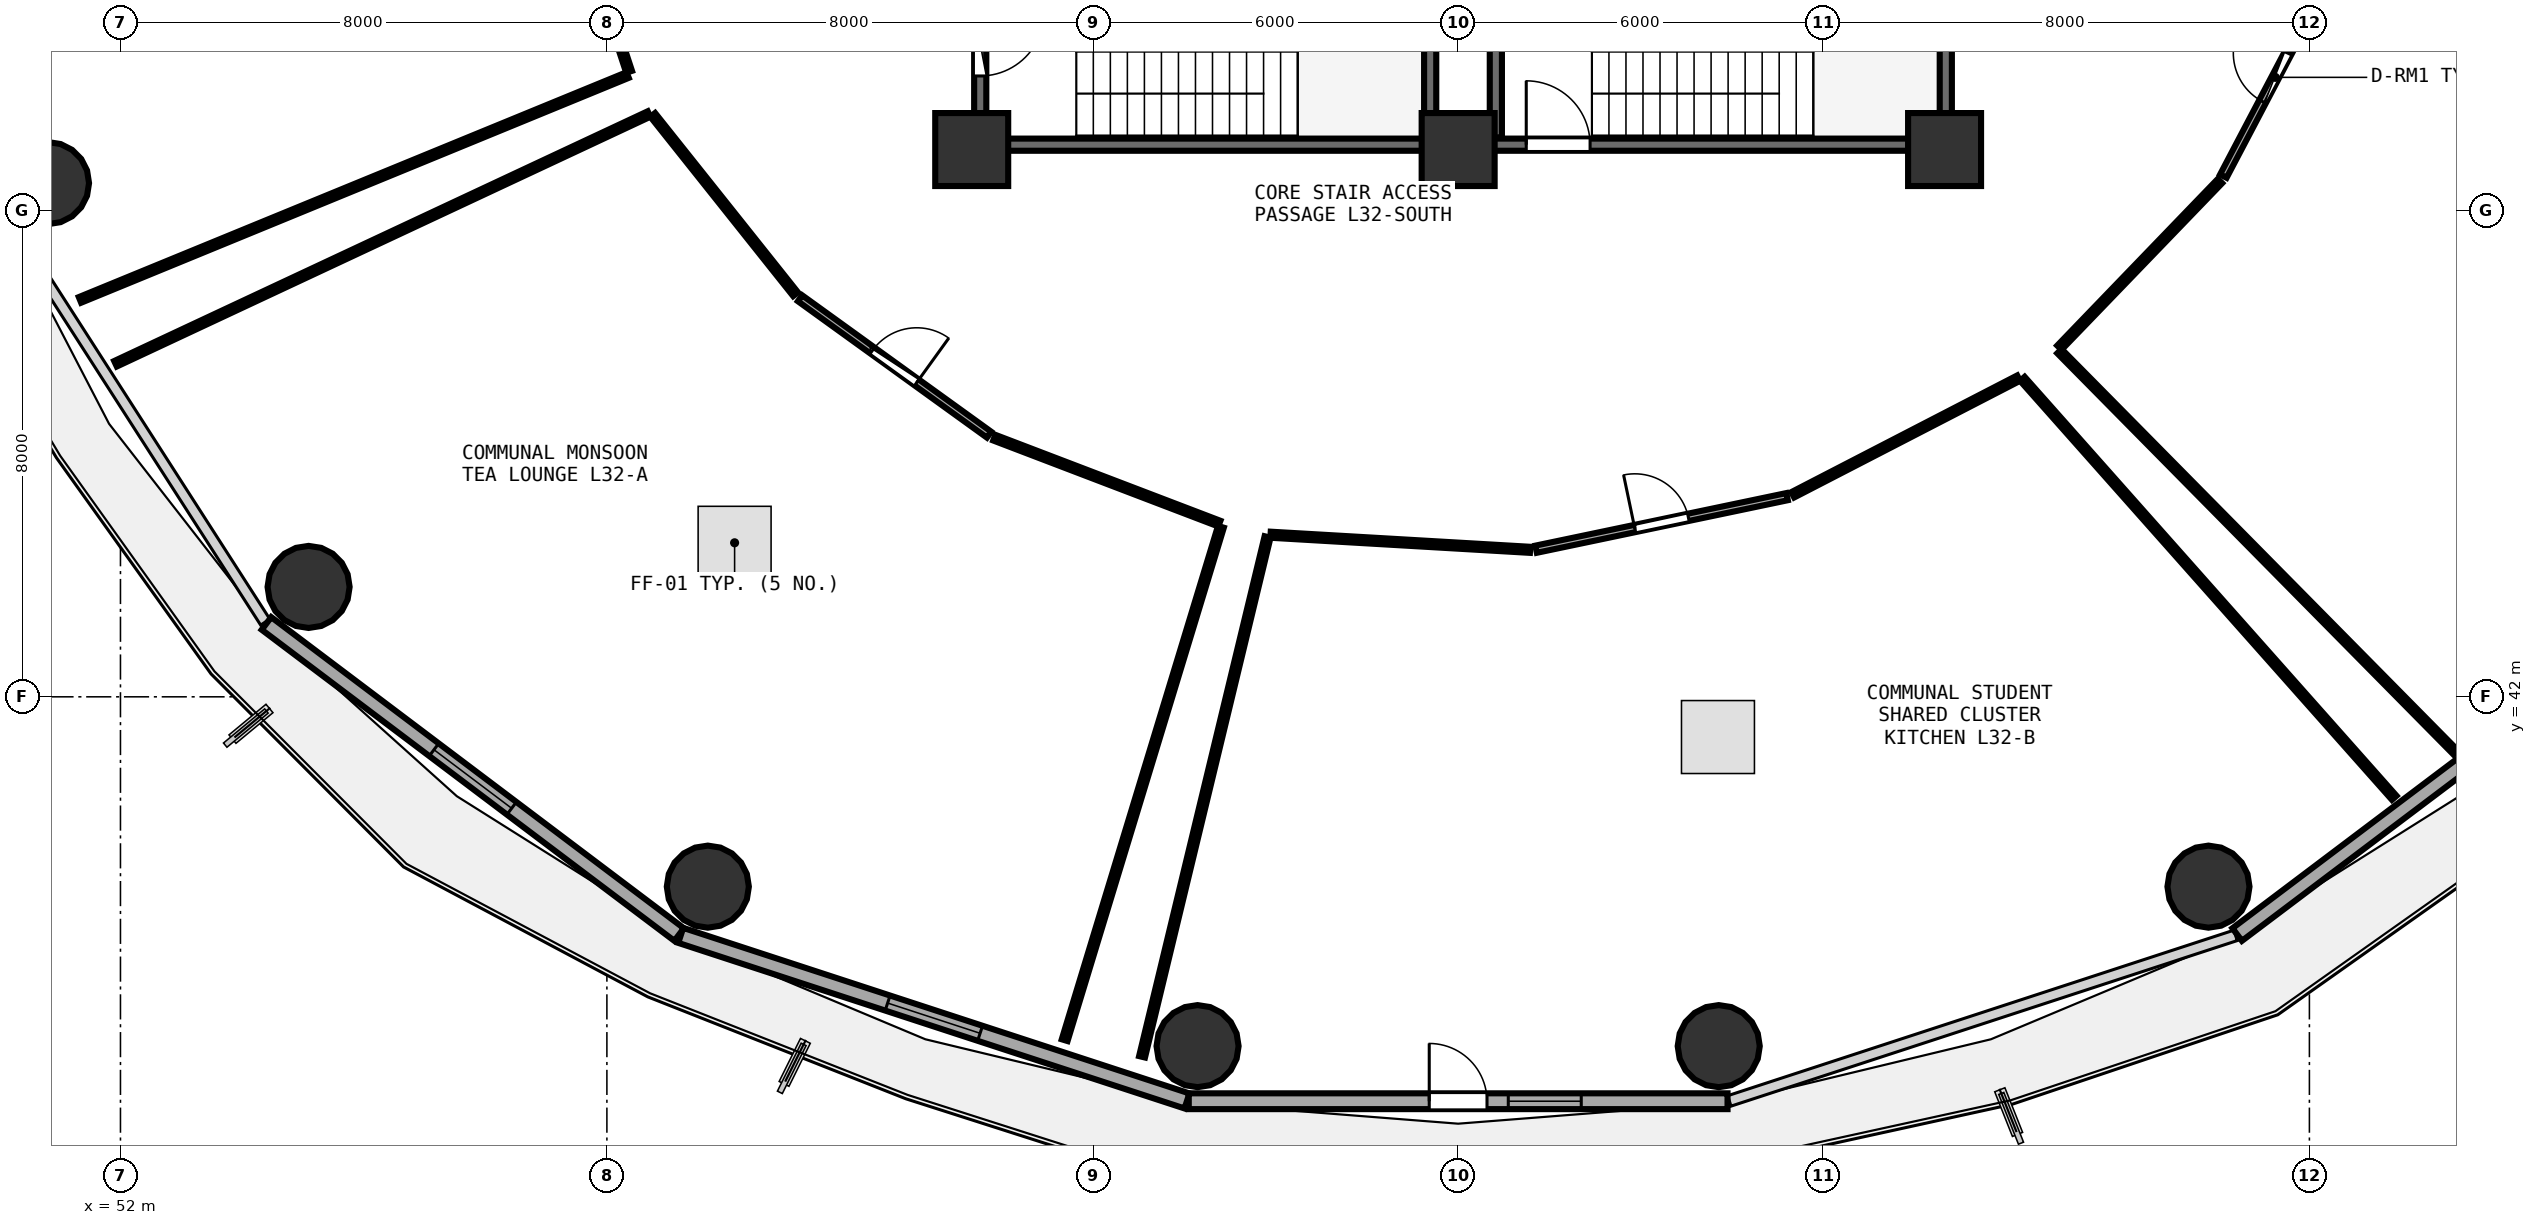
"""IFC4 building model, lengths in metres.
Left out: names, types, materials, properties, quantities, classifications, styles, units other than length and angle.
Written with IfcOpenShell. Run it as: python <this file> out.ifc"""

import sys

from ifc_helpers import new_model, si_unit, direction, frame, frame_2d, origin, origin_2d, place, context, subcontext, project, spatial, rectangle, circle, extrude, element, fill, save


model = new_model("IFC4")
c1 = context("Model", 3, precision=1e-05, world=origin(), true_north=direction((0.0, 1.0)))
c2 = subcontext(c1, "Body", "Model", "MODEL_VIEW")
j1 = project(units=[si_unit("LENGTHUNIT", "METRE"), si_unit("PLANEANGLEUNIT", "RADIAN")], contexts=[c1])
p1 = place(None, origin())
s1 = spatial("IfcSite", under=j1, at=p1, CompositionType="ELEMENT")
p2 = place(p1, origin())
s2 = spatial("IfcBuilding", under=s1, at=p2, CompositionType="ELEMENT")
p3 = place(p2, frame((0.0, 0.0, 125.1)))
s3 = spatial("IfcBuildingStorey", under=s2, at=p3, CompositionType="ELEMENT", Elevation=125.1)
for number, where, z_axis, x_axis in (
    (1, (66.0, 51.0, 0.0), (0.0, 0.0, 1.0), (1.0, 0.0, 0.0)),
    (2, (74.0, 51.0, 0.0), (0.0, 0.0, 1.0), (1.0, 0.0, 0.0)),
    (3, (82.0, 51.0, 0.0), (0.0, 0.0, 1.0), (1.0, 0.0, 0.0)),
):
    element("IfcColumn", number, at=place(p3, frame(where, z_axis=z_axis, x_axis=x_axis)), inside=s3, PredefinedType="PILASTER", context=c2, shape_type="SweptSolid", body=[
        extrude(rectangle(XDim=1.2, YDim=1.2, at=origin_2d()), origin(), (0.0, 0.0, 1.0), 4.76),
    ])
for number, where, z_axis, x_axis in (
    (4, (50.808, 50.448, 0.0), (0.0, 0.0, 1.0), (1.0, 0.0, 0.0)),
    (5, (55.094, 43.807, 0.0), (0.0, 0.0, 1.0), (1.0, 0.0, 0.0)),
    (6, (61.66, 38.878, 0.0), (0.0, 0.0, 1.0), (1.0, 0.0, 0.0)),
    (7, (69.714, 36.255, 0.0), (0.0, 0.0, 1.0), (1.0, 0.0, 0.0)),
    (8, (78.286, 36.255, 0.0), (0.0, 0.0, 1.0), (1.0, 0.0, 0.0)),
    (9, (86.34, 38.878, 0.0), (0.0, 0.0, 1.0), (1.0, 0.0, 0.0)),
):
    element("IfcColumn", number, at=place(p3, frame(where, z_axis=z_axis, x_axis=x_axis)), inside=s3, PredefinedType="COLUMN", context=c2, shape_type="SweptSolid", body=[
        extrude(circle(Radius=0.675, at=origin_2d()), origin(), (0.0, 0.0, 1.0), 4.76),
    ])
p4 = place(p3, frame((54.401, 43.207, 0.0), z_axis=(0.0, 0.0, 1.0), x_axis=(0.798501507879, -0.601992808857, 0.0)))
e10 = element("IfcWall", 10, at=p4, inside=s3, PredefinedType="SOLIDWALL", context=c2, shape_type="SweptSolid", body=[
    extrude(rectangle(XDim=8.499, YDim=0.26, at=frame_2d((4.25, 0.0))), origin(), (0.0, 0.0, 1.0), 4.345),
])
p5 = place(p4, frame((3.45, 0.0, 0.85)))
e11 = element("IfcOpeningElement", 11, at=p5, cuts=e10, PredefinedType="OPENING", context=c2, shape_type="SweptSolid", body=[
    extrude(rectangle(XDim=1.6, YDim=1.45, at=frame_2d((0.8, 0.725))), frame((0.0, 0.14, 0.0), z_axis=(0.0, -1.0, 0.0), x_axis=(1.0, 0.0, 0.0)), (0.0, 0.0, 1.0), 0.28),
])
p6 = place(p3, frame((61.214, 38.077, 0.0), z_axis=(0.0, 0.0, 1.0), x_axis=(0.950471101963, -0.310812941064, 0.0)))
e12 = element("IfcWall", 12, at=p6, inside=s3, PredefinedType="SOLIDWALL", context=c2, shape_type="SweptSolid", body=[
    extrude(rectangle(XDim=8.76, YDim=0.26, at=frame_2d((4.38, 0.0))), origin(), (0.0, 0.0, 1.0), 4.345),
])
p7 = place(p6, frame((3.58, 0.0, 0.85)))
e13 = element("IfcOpeningElement", 13, at=p7, cuts=e12, PredefinedType="OPENING", context=c2, shape_type="SweptSolid", body=[
    extrude(rectangle(XDim=1.6, YDim=1.45, at=frame_2d((0.8, 0.725))), frame((0.0, 0.14, 0.0), z_axis=(0.0, -1.0, 0.0), x_axis=(1.0, 0.0, 0.0)), (0.0, 0.0, 1.0), 0.28),
])
p8 = place(p3, frame((69.57, 35.349, 0.0), z_axis=(0.0, 0.0, 1.0), x_axis=(1.0, 0.0, 0.0)))
e14 = element("IfcWall", 14, at=p8, inside=s3, PredefinedType="SOLIDWALL", context=c2, shape_type="SweptSolid", body=[
    extrude(rectangle(XDim=8.861, YDim=0.26, at=frame_2d((4.43, 0.0))), origin(), (0.0, 0.0, 1.0), 4.345),
])
p9 = place(p8, frame((3.955, 0.0, 0.0)))
e15 = element("IfcOpeningElement", 15, at=p9, cuts=e14, PredefinedType="OPENING", context=c2, shape_type="SweptSolid", body=[
    extrude(rectangle(XDim=0.95, YDim=2.1, at=frame_2d((0.475, 1.05))), frame((0.0, 0.14, 0.0), z_axis=(0.0, -1.0, 0.0), x_axis=(1.0, 0.0, 0.0)), (0.0, 0.0, 1.0), 0.28),
])
p10 = place(p8, frame((5.255, 0.0, 0.85)))
e16 = element("IfcOpeningElement", 16, at=p10, cuts=e14, PredefinedType="OPENING", context=c2, shape_type="SweptSolid", body=[
    extrude(rectangle(XDim=1.2, YDim=1.45, at=frame_2d((0.6, 0.725))), frame((0.0, 0.14, 0.0), z_axis=(0.0, -1.0, 0.0), x_axis=(1.0, 0.0, 0.0)), (0.0, 0.0, 1.0), 0.28),
])
p11 = place(p3, frame((86.812, 38.09, 0.0), z_axis=(0.0, 0.0, 1.0), x_axis=(0.798501507879, 0.601992808857, 0.0)))
e17 = element("IfcWall", 17, at=p11, inside=s3, PredefinedType="SOLIDWALL", context=c2, shape_type="SweptSolid", body=[
    extrude(rectangle(XDim=8.499, YDim=0.26, at=frame_2d((4.25, 0.0))), origin(), (0.0, 0.0, 1.0), 4.345),
])
p12 = place(p11, frame((5.07, 0.0, 0.85)))
e18 = element("IfcOpeningElement", 18, at=p12, cuts=e17, PredefinedType="OPENING", context=c2, shape_type="SweptSolid", body=[
    extrude(rectangle(XDim=1.6, YDim=1.45, at=frame_2d((0.8, 0.725))), frame((0.0, 0.14, 0.0), z_axis=(0.0, -1.0, 0.0), x_axis=(1.0, 0.0, 0.0)), (0.0, 0.0, 1.0), 0.28),
])
p13 = place(p3, frame((74.0, 51.08, 0.0), z_axis=(0.0, 0.0, 1.0), x_axis=(1.0, 0.0, 0.0)))
e19 = element("IfcWall", 19, at=p13, inside=s3, PredefinedType="SHEAR", context=c2, shape_type="SweptSolid", body=[
    extrude(rectangle(XDim=7.9, YDim=0.2, at=frame_2d((3.95, 0.0))), origin(), (0.0, 0.0, 1.0), 4.36),
])
p14 = place(p13, frame((1.12, 0.0, 0.0)))
e20 = element("IfcOpeningElement", 20, at=p14, cuts=e19, PredefinedType="OPENING", context=c2, shape_type="SweptSolid", body=[
    extrude(rectangle(XDim=1.05, YDim=2.1, at=frame_2d((0.525, 1.05))), frame((0.0, 0.11, 0.0), z_axis=(0.0, -1.0, 0.0), x_axis=(1.0, 0.0, 0.0)), (0.0, 0.0, 1.0), 0.22),
])
for number, where, z_axis, x_axis in (
    (21, (82.02, 51.2, 0.0), (0.0, 0.0, 1.0), (0.0, 1.0, 0.0)),
    (22, (74.62, 54.27, 0.0), (0.0, 0.0, 1.0), (0.0, -1.0, 0.0)),
):
    element("IfcWall", number, at=place(p3, frame(where, z_axis=z_axis, x_axis=x_axis)), inside=s3, PredefinedType="SHEAR", context=c2, shape_type="SweptSolid", body=[
        extrude(rectangle(XDim=3.07, YDim=0.2, at=frame_2d((1.535, 0.0))), origin(), (0.0, 0.0, 1.0), 4.36),
    ])
p15 = place(p3, frame((66.26, 51.08, 0.0), z_axis=(0.0, 0.0, 1.0), x_axis=(1.0, 0.0, 0.0)))
e23 = element("IfcWall", 23, at=p15, inside=s3, PredefinedType="SHEAR", context=c2, shape_type="SweptSolid", body=[
    extrude(rectangle(XDim=7.16, YDim=0.2, at=frame_2d((3.58, 0.0))), origin(), (0.0, 0.0, 1.0), 4.36),
])
p16 = place(p3, frame((73.54, 51.2, 0.0), z_axis=(0.0, 0.0, 1.0), x_axis=(0.0, 1.0, 0.0)))
e24 = element("IfcWall", 24, at=p16, inside=s3, PredefinedType="SHEAR", context=c2, shape_type="SweptSolid", body=[
    extrude(rectangle(XDim=3.07, YDim=0.2, at=frame_2d((1.535, 0.0))), origin(), (0.0, 0.0, 1.0), 4.36),
])
p17 = place(p3, frame((66.14, 54.27, 0.0), z_axis=(0.0, 0.0, 1.0), x_axis=(0.0, -1.0, 0.0)))
e25 = element("IfcWall", 25, at=p17, inside=s3, PredefinedType="SHEAR", context=c2, shape_type="SweptSolid", body=[
    extrude(rectangle(XDim=3.07, YDim=0.2, at=frame_2d((1.535, 0.0))), origin(), (0.0, 0.0, 1.0), 4.36),
])
p18 = place(p17, frame((1.01, 0.0, 0.0)))
e26 = element("IfcOpeningElement", 26, at=p18, cuts=e25, PredefinedType="OPENING", context=c2, shape_type="SweptSolid", body=[
    extrude(rectangle(XDim=1.05, YDim=2.1, at=frame_2d((0.525, 1.05))), frame((0.0, 0.11, 0.0), z_axis=(0.0, -1.0, 0.0), x_axis=(1.0, 0.0, 0.0)), (0.0, 0.0, 1.0), 0.22),
])
p19 = place(p3, frame((63.177, 48.554, 0.0), z_axis=(0.0, 0.0, 1.0), x_axis=(0.81095288651, -0.585111455931, 0.0)))
e27 = element("IfcWall", 27, at=p19, inside=s3, PredefinedType="PARTITIONING", context=c2, shape_type="SweptSolid", body=[
    extrude(rectangle(XDim=3.833, YDim=0.12, at=frame_2d((1.917, 0.0))), origin(), (0.0, 0.0, 1.0), 2.345),
])
p20 = place(p19, frame((1.467, 0.0, 0.0)))
e28 = element("IfcOpeningElement", 28, at=p20, cuts=e27, PredefinedType="OPENING", context=c2, shape_type="SweptSolid", body=[
    extrude(rectangle(XDim=0.9, YDim=2.08, at=frame_2d((0.45, 1.04))), frame((0.0, 0.07, 0.0), z_axis=(0.0, -1.0, 0.0), x_axis=(1.0, 0.0, 0.0)), (0.0, 0.0, 1.0), 0.14),
])
p21 = place(p3, frame((75.282, 44.427, 0.0), z_axis=(0.0, 0.0, 1.0), x_axis=(0.978761188048, 0.205003748189, 0.0)))
e29 = element("IfcWall", 29, at=p21, inside=s3, PredefinedType="PARTITIONING", context=c2, shape_type="SweptSolid", body=[
    extrude(rectangle(XDim=4.217, YDim=0.12, at=frame_2d((2.108, 0.0))), origin(), (0.0, 0.0, 1.0), 4.35),
])
p22 = place(p21, frame((1.659, 0.0, 0.0)))
e30 = element("IfcOpeningElement", 30, at=p22, cuts=e29, PredefinedType="OPENING", context=c2, shape_type="SweptSolid", body=[
    extrude(rectangle(XDim=0.9, YDim=2.08, at=frame_2d((0.45, 1.04))), frame((0.0, 0.07, 0.0), z_axis=(0.0, -1.0, 0.0), x_axis=(1.0, 0.0, 0.0)), (0.0, 0.0, 1.0), 0.14),
])
p23 = place(p3, frame((86.585, 50.563, 0.0), z_axis=(0.0, 0.0, 1.0), x_axis=(0.465507861705, 0.885043745072, 0.0)))
e31 = element("IfcWall", 31, at=p23, inside=s3, PredefinedType="PARTITIONING", context=c2, shape_type="SweptSolid", body=[
    extrude(rectangle(XDim=3.67, YDim=0.12, at=frame_2d((1.835, 0.0))), origin(), (0.0, 0.0, 1.0), 2.345),
])
p24 = place(p23, frame((1.385, 0.0, 0.0)))
e32 = element("IfcOpeningElement", 32, at=p24, cuts=e31, PredefinedType="OPENING", context=c2, shape_type="SweptSolid", body=[
    extrude(rectangle(XDim=0.9, YDim=2.08, at=frame_2d((0.45, 1.04))), frame((0.0, 0.07, 0.0), z_axis=(0.0, -1.0, 0.0), x_axis=(1.0, 0.0, 0.0)), (0.0, 0.0, 1.0), 0.14),
])
p25 = place(p3, frame((59.142, 55.987, 0.0), z_axis=(0.0, 0.0, 1.0), x_axis=(0.313357160862, -0.949635345665, 0.0)))
e33 = element("IfcWall", 33, at=p25, inside=s3, PredefinedType="PARTITIONING", context=c2, shape_type="SweptSolid", body=[
    extrude(rectangle(XDim=3.906, YDim=0.1, at=frame_2d((1.953, 0.0))), origin(), (0.0, 0.0, 1.0), 4.35),
])
p26 = place(p3, frame((60.341, 52.225, 0.0), z_axis=(0.0, 0.0, 1.0), x_axis=(-0.925076928734, -0.379779772927, 0.0)))
e34 = element("IfcWall", 34, at=p26, inside=s3, PredefinedType="PARTITIONING", context=c2, shape_type="SweptSolid", body=[
    extrude(rectangle(XDim=9.737, YDim=0.1, at=frame_2d((4.868, 0.0))), origin(), (0.0, 0.0, 1.0), 2.345),
])
p27 = place(p3, frame((60.754, 51.57, 0.0), z_axis=(0.0, 0.0, 1.0), x_axis=(0.623035378293, -0.78219365722, 0.0)))
e35 = element("IfcWall", 35, at=p27, inside=s3, PredefinedType="PARTITIONING", context=c2, shape_type="SweptSolid", body=[
    extrude(rectangle(XDim=3.771, YDim=0.1, at=frame_2d((1.885, 0.0))), origin(), (0.0, 0.0, 1.0), 2.345),
])
p28 = place(p3, frame((66.371, 46.262, 0.0), z_axis=(0.0, 0.0, 1.0), x_axis=(0.934205317769, -0.356735790539, 0.0)))
e36 = element("IfcWall", 36, at=p28, inside=s3, PredefinedType="PARTITIONING", context=c2, shape_type="SweptSolid", body=[
    extrude(rectangle(XDim=3.962, YDim=0.1, at=frame_2d((1.981, 0.0))), origin(), (0.0, 0.0, 1.0), 2.345),
])
p29 = place(p3, frame((70.098, 44.796, 0.0), z_axis=(0.0, 0.0, 1.0), x_axis=(-0.291203448286, -0.956661147798, 0.0)))
e37 = element("IfcWall", 37, at=p29, inside=s3, PredefinedType="PARTITIONING", context=c2, shape_type="SweptSolid", body=[
    extrude(rectangle(XDim=8.825, YDim=0.1, at=frame_2d((4.413, 0.0))), origin(), (0.0, 0.0, 1.0), 2.345),
])
p30 = place(p3, frame((51.918, 47.477, 0.0), z_axis=(0.0, 0.0, 1.0), x_axis=(0.905704224886, 0.423910199244, 0.0)))
e38 = element("IfcWall", 38, at=p30, inside=s3, PredefinedType="PARTITIONING", context=c2, shape_type="SweptSolid", body=[
    extrude(rectangle(XDim=9.688, YDim=0.1, at=frame_2d((4.844, 0.0))), origin(), (0.0, 0.0, 1.0), 2.345),
])
p31 = place(p3, frame((70.915, 44.666, 0.0), z_axis=(0.0, 0.0, 1.0), x_axis=(0.998309049084, -0.058129532229, 0.0)))
e39 = element("IfcWall", 39, at=p31, inside=s3, PredefinedType="PARTITIONING", context=c2, shape_type="SweptSolid", body=[
    extrude(rectangle(XDim=4.276, YDim=0.1, at=frame_2d((2.138, 0.0))), origin(), (0.0, 0.0, 1.0), 4.35),
])
p32 = place(p3, frame((79.503, 45.323, 0.0), z_axis=(0.0, 0.0, 1.0), x_axis=(0.888522350378, 0.458833338892, 0.0)))
e40 = element("IfcWall", 40, at=p32, inside=s3, PredefinedType="PARTITIONING", context=c2, shape_type="SweptSolid", body=[
    extrude(rectangle(XDim=4.18, YDim=0.1, at=frame_2d((2.09, 0.0))), origin(), (0.0, 0.0, 1.0), 2.345),
])
p33 = place(p3, frame((83.28, 47.229, 0.0), z_axis=(0.0, 0.0, 1.0), x_axis=(0.66384227407, -0.747872606235, 0.0)))
e41 = element("IfcWall", 41, at=p33, inside=s3, PredefinedType="PARTITIONING", context=c2, shape_type="SweptSolid", body=[
    extrude(rectangle(XDim=9.213, YDim=0.1, at=frame_2d((4.606, 0.0))), origin(), (0.0, 0.0, 1.0), 2.345),
])
p34 = place(p3, frame((68.802, 36.08, 0.0), z_axis=(0.0, 0.0, 1.0), x_axis=(0.234676713539, 0.972073474652, 0.0)))
e42 = element("IfcWall", 42, at=p34, inside=s3, PredefinedType="PARTITIONING", context=c2, shape_type="SweptSolid", body=[
    extrude(rectangle(XDim=8.795, YDim=0.1, at=frame_2d((4.397, 0.0))), origin(), (0.0, 0.0, 1.0), 2.345),
])
p35 = place(p3, frame((83.889, 47.742, 0.0), z_axis=(0.0, 0.0, 1.0), x_axis=(0.693960990079, 0.720012600062, 0.0)))
e43 = element("IfcWall", 43, at=p35, inside=s3, PredefinedType="PARTITIONING", context=c2, shape_type="SweptSolid", body=[
    extrude(rectangle(XDim=3.805, YDim=0.1, at=frame_2d((1.902, 0.0))), origin(), (0.0, 0.0, 1.0), 2.345),
])
p36 = place(p3, frame((90.406, 41.085, 0.0), z_axis=(0.0, 0.0, 1.0), x_axis=(-0.702657333511, 0.71152840538, 0.0)))
e44 = element("IfcWall", 44, at=p36, inside=s3, PredefinedType="PARTITIONING", context=c2, shape_type="SweptSolid", body=[
    extrude(rectangle(XDim=9.275, YDim=0.1, at=frame_2d((4.637, 0.0))), origin(), (0.0, 0.0, 1.0), 2.345),
])
p37 = place(p5, origin())
e45 = element("IfcWindow", 45, at=p37, inside=s3, PartitioningType="SINGLE_PANEL", PredefinedType="WINDOW", context=c2, shape_type="SweptSolid", body=[
    extrude(rectangle(XDim=1.6, YDim=1.45, at=frame_2d((0.8, 0.725))), frame((0.0, 0.03, 0.0), z_axis=(0.0, -1.0, 0.0), x_axis=(1.0, 0.0, 0.0)), (0.0, 0.0, 1.0), 0.06),
])
fill(e11, e45)
p38 = place(p7, origin())
e46 = element("IfcWindow", 46, at=p38, inside=s3, PartitioningType="SINGLE_PANEL", PredefinedType="WINDOW", context=c2, shape_type="SweptSolid", body=[
    extrude(rectangle(XDim=1.6, YDim=1.45, at=frame_2d((0.8, 0.725))), frame((0.0, 0.03, 0.0), z_axis=(0.0, -1.0, 0.0), x_axis=(1.0, 0.0, 0.0)), (0.0, 0.0, 1.0), 0.06),
])
fill(e13, e46)
p39 = place(p9, frame((0.95, 0.0, 0.0), z_axis=(0.0, 0.0, 1.0), x_axis=(-1.0, 0.0, 0.0)))
e47 = element("IfcDoor", 47, at=p39, inside=s3, OperationType="SINGLE_SWING_RIGHT", PredefinedType="DOOR", context=c2, shape_type="SweptSolid", body=[
    extrude(rectangle(XDim=0.95, YDim=2.1, at=frame_2d((0.475, 1.05))), frame((0.0, 0.025, 0.0), z_axis=(0.0, -1.0, 0.0), x_axis=(1.0, 0.0, 0.0)), (0.0, 0.0, 1.0), 0.05),
])
fill(e15, e47)
p40 = place(p10, origin())
e48 = element("IfcWindow", 48, at=p40, inside=s3, PartitioningType="SINGLE_PANEL", PredefinedType="WINDOW", context=c2, shape_type="SweptSolid", body=[
    extrude(rectangle(XDim=1.2, YDim=1.45, at=frame_2d((0.6, 0.725))), frame((0.0, 0.03, 0.0), z_axis=(0.0, -1.0, 0.0), x_axis=(1.0, 0.0, 0.0)), (0.0, 0.0, 1.0), 0.06),
])
fill(e16, e48)
p41 = place(p14, origin())
e49 = element("IfcDoor", 49, at=p41, inside=s3, OperationType="SINGLE_SWING_LEFT", PredefinedType="DOOR", context=c2, shape_type="SweptSolid", body=[
    extrude(rectangle(XDim=1.05, YDim=2.1, at=frame_2d((0.525, 1.05))), frame((0.0, 0.025, 0.0), z_axis=(0.0, -1.0, 0.0), x_axis=(1.0, 0.0, 0.0)), (0.0, 0.0, 1.0), 0.05),
])
fill(e20, e49)
p42 = place(p18, origin())
e50 = element("IfcDoor", 50, at=p42, inside=s3, OperationType="SINGLE_SWING_LEFT", PredefinedType="DOOR", context=c2, shape_type="SweptSolid", body=[
    extrude(rectangle(XDim=1.05, YDim=2.1, at=frame_2d((0.525, 1.05))), frame((0.0, 0.025, 0.0), z_axis=(0.0, -1.0, 0.0), x_axis=(1.0, 0.0, 0.0)), (0.0, 0.0, 1.0), 0.05),
])
fill(e26, e50)
p43 = place(p20, origin())
e51 = element("IfcDoor", 51, at=p43, inside=s3, OperationType="SINGLE_SWING_RIGHT", PredefinedType="DOOR", context=c2, shape_type="SweptSolid", body=[
    extrude(rectangle(XDim=0.9, YDim=2.08, at=frame_2d((0.45, 1.04))), frame((0.0, 0.025, 0.0), z_axis=(0.0, -1.0, 0.0), x_axis=(1.0, 0.0, 0.0)), (0.0, 0.0, 1.0), 0.05),
])
fill(e28, e51)
p44 = place(p22, origin())
e52 = element("IfcDoor", 52, at=p44, inside=s3, OperationType="SINGLE_SWING_LEFT", PredefinedType="DOOR", context=c2, shape_type="SweptSolid", body=[
    extrude(rectangle(XDim=0.9, YDim=2.08, at=frame_2d((0.45, 1.04))), frame((0.0, 0.025, 0.0), z_axis=(0.0, -1.0, 0.0), x_axis=(1.0, 0.0, 0.0)), (0.0, 0.0, 1.0), 0.05),
])
fill(e30, e52)
p45 = place(p24, origin())
e53 = element("IfcDoor", 53, at=p45, inside=s3, OperationType="SINGLE_SWING_RIGHT", PredefinedType="DOOR", context=c2, shape_type="SweptSolid", body=[
    extrude(rectangle(XDim=0.9, YDim=2.08, at=frame_2d((0.45, 1.04))), frame((0.0, 0.025, 0.0), z_axis=(0.0, -1.0, 0.0), x_axis=(1.0, 0.0, 0.0)), (0.0, 0.0, 1.0), 0.05),
])
fill(e32, e53)
save(model, sys.argv[1])
